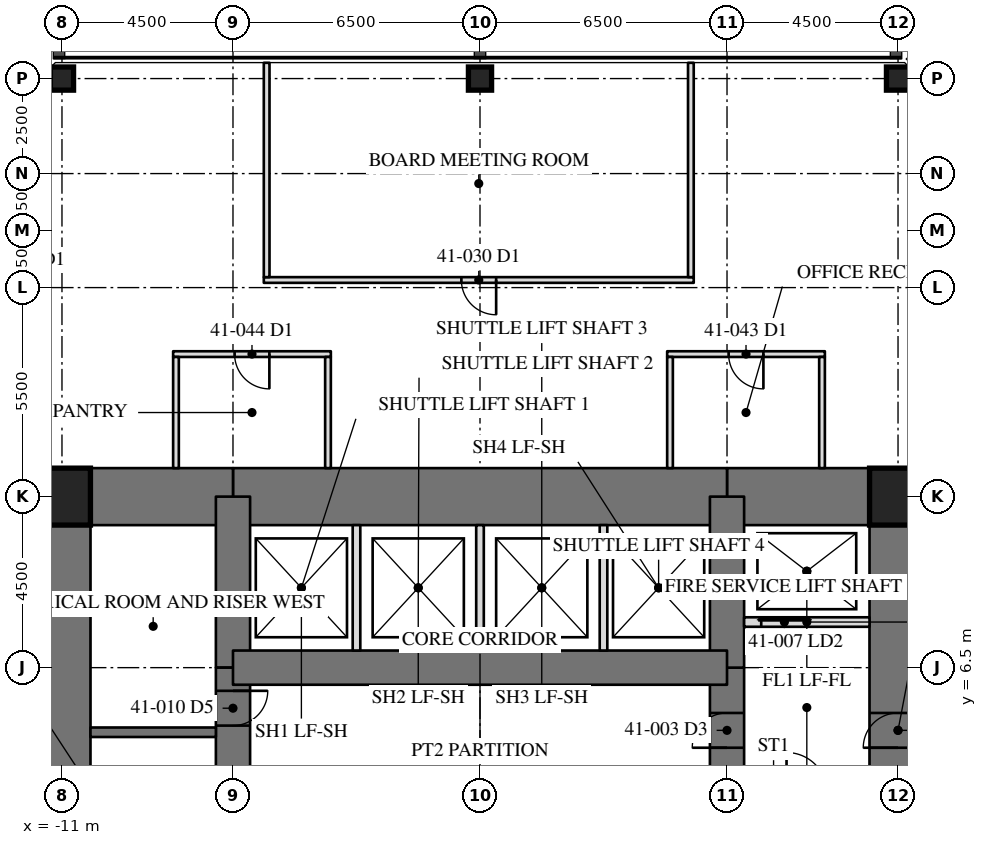
"""IFC4 building model, lengths in metres.
Left out: names, types, materials, properties, quantities, classifications, styles, units other than length and angle.
Written with IfcOpenShell. Run it as: python <this file> out.ifc"""

import sys

from ifc_helpers import new_model, si_unit, direction, frame, frame_2d, origin, origin_2d, place, context, subcontext, project, spatial, rectangle, hollow_rectangle, extrude, element, fill, save


model = new_model("IFC4")
c1 = context("Model", 3, precision=1e-05, world=origin(), true_north=direction((0.0, 1.0)))
c2 = subcontext(c1, "Body", "Model", "MODEL_VIEW")
j1 = project(units=[si_unit("LENGTHUNIT", "METRE"), si_unit("PLANEANGLEUNIT", "RADIAN")], contexts=[c1])
p1 = place(None, origin())
s1 = spatial("IfcSite", under=j1, at=p1, CompositionType="ELEMENT")
p2 = place(p1, origin())
s2 = spatial("IfcBuilding", under=s1, at=p2, CompositionType="ELEMENT")
p3 = place(p2, frame((0.0, 0.0, 174.6)))
s3 = spatial("IfcBuildingStorey", under=s2, at=p3, CompositionType="ELEMENT", Elevation=174.6)
for number, where, z_axis, x_axis in (
    (1, (11.0, 22.0, 0.0), (0.0, 0.0, 1.0), (1.0, 0.0, 0.0)),
    (2, (0.0, 22.0, 0.0), (0.0, 0.0, 1.0), (1.0, 0.0, 0.0)),
    (3, (-11.0, 22.0, 0.0), (0.0, 0.0, 1.0), (1.0, 0.0, 0.0)),
):
    element("IfcColumn", number, at=place(p3, frame(where, z_axis=z_axis, x_axis=x_axis)), inside=s3, PredefinedType="COLUMN", context=c2, shape_type="SweptSolid", body=[
        extrude(hollow_rectangle(XDim=0.61, YDim=0.61, WallThickness=0.076, at=origin_2d()), origin(), (0.0, 0.0, 1.0), 4.1),
    ])
p4 = place(p3, frame((11.0, -11.0, 0.0), z_axis=(0.0, 0.0, 1.0), x_axis=(0.0, 1.0, 0.0)))
e4 = element("IfcWall", 4, at=p4, inside=s3, PredefinedType="SHEAR", context=c2, shape_type="SweptSolid", body=[
    extrude(rectangle(XDim=22.0, YDim=1.5, at=frame_2d((11.0, 0.0))), origin(), (0.0, 0.0, 1.0), 4.1),
])
p5 = place(p4, frame((15.393, 0.0, 0.0)))
e5 = element("IfcOpeningElement", 5, at=p5, cuts=e4, PredefinedType="OPENING", context=c2, shape_type="SweptSolid", body=[
    extrude(rectangle(XDim=0.915, YDim=2.134, at=frame_2d((0.458, 1.067))), frame((0.0, 0.76, 0.0), z_axis=(0.0, -1.0, 0.0), x_axis=(1.0, 0.0, 0.0)), (0.0, 0.0, 1.0), 1.52),
])
p6 = place(p3, frame((-11.0, 11.0, 0.0), z_axis=(0.0, 0.0, 1.0), x_axis=(0.0, -1.0, 0.0)))
e6 = element("IfcWall", 6, at=p6, inside=s3, PredefinedType="SHEAR", context=c2, shape_type="SweptSolid", body=[
    extrude(rectangle(XDim=22.0, YDim=1.5, at=frame_2d((11.0, 0.0))), origin(), (0.0, 0.0, 1.0), 4.1),
])
p7 = place(p6, frame((15.393, 0.0, 0.0)))
e7 = element("IfcOpeningElement", 7, at=p7, cuts=e6, PredefinedType="OPENING", context=c2, shape_type="SweptSolid", body=[
    extrude(rectangle(XDim=0.915, YDim=2.134, at=frame_2d((0.458, 1.067))), frame((0.0, 0.76, 0.0), z_axis=(0.0, -1.0, 0.0), x_axis=(1.0, 0.0, 0.0)), (0.0, 0.0, 1.0), 1.52),
])
p8 = place(p3, frame((11.0, 11.0, 0.0), z_axis=(0.0, 0.0, 1.0), x_axis=(-1.0, 0.0, 0.0)))
e8 = element("IfcWall", 8, at=p8, inside=s3, PredefinedType="SHEAR", context=c2, shape_type="SweptSolid", body=[
    extrude(rectangle(XDim=4.5, YDim=1.5, at=frame_2d((2.25, 0.0))), origin(), (0.0, 0.0, 1.0), 4.1),
])
p9 = place(p3, frame((6.5, 11.0, 0.0), z_axis=(0.0, 0.0, 1.0), x_axis=(-1.0, 0.0, 0.0)))
e9 = element("IfcWall", 9, at=p9, inside=s3, PredefinedType="SHEAR", context=c2, shape_type="SweptSolid", body=[
    extrude(rectangle(XDim=13.0, YDim=1.5, at=frame_2d((6.5, 0.0))), origin(), (0.0, 0.0, 1.0), 4.1),
])
p10 = place(p3, frame((-6.5, 11.0, 0.0), z_axis=(0.0, 0.0, 1.0), x_axis=(-1.0, 0.0, 0.0)))
e10 = element("IfcWall", 10, at=p10, inside=s3, PredefinedType="SHEAR", context=c2, shape_type="SweptSolid", body=[
    extrude(rectangle(XDim=4.5, YDim=1.5, at=frame_2d((2.25, 0.0))), origin(), (0.0, 0.0, 1.0), 4.1),
])
p11 = place(p3, frame((6.5, -6.5, 0.0), z_axis=(0.0, 0.0, 1.0), x_axis=(0.0, 1.0, 0.0)))
e11 = element("IfcWall", 11, at=p11, inside=s3, PredefinedType="SHEAR", context=c2, shape_type="SweptSolid", body=[
    extrude(rectangle(XDim=13.0, YDim=0.9, at=frame_2d((6.5, 0.0))), origin(), (0.0, 0.0, 1.0), 4.1),
])
p12 = place(p11, frame((10.893, 0.0, 0.0)))
e12 = element("IfcOpeningElement", 12, at=p12, cuts=e11, PredefinedType="OPENING", context=c2, shape_type="SweptSolid", body=[
    extrude(rectangle(XDim=0.915, YDim=2.134, at=frame_2d((0.458, 1.067))), frame((0.0, 0.46, 0.0), z_axis=(0.0, -1.0, 0.0), x_axis=(1.0, 0.0, 0.0)), (0.0, 0.0, 1.0), 0.92),
])
p13 = place(p11, frame((0.61, 0.0, 0.0)))
e13 = element("IfcOpeningElement", 13, at=p13, cuts=e11, PredefinedType="OPENING", context=c2, shape_type="SweptSolid", body=[
    extrude(rectangle(XDim=0.915, YDim=2.134, at=frame_2d((0.458, 1.067))), frame((0.0, 0.46, 0.0), z_axis=(0.0, -1.0, 0.0), x_axis=(1.0, 0.0, 0.0)), (0.0, 0.0, 1.0), 0.92),
])
for number, where, z_axis, x_axis in (
    (14, (6.5, 6.5, 0.0), (0.0, 0.0, 1.0), (0.0, 1.0, 0.0)),
    (15, (-6.5, 11.0, 0.0), (0.0, 0.0, 1.0), (0.0, -1.0, 0.0)),
):
    element("IfcWall", number, at=place(p3, frame(where, z_axis=z_axis, x_axis=x_axis)), inside=s3, PredefinedType="SHEAR", context=c2, shape_type="SweptSolid", body=[
        extrude(rectangle(XDim=4.5, YDim=0.9, at=frame_2d((2.25, 0.0))), origin(), (0.0, 0.0, 1.0), 4.1),
    ])
p14 = place(p3, frame((-6.5, 6.5, 0.0), z_axis=(0.0, 0.0, 1.0), x_axis=(0.0, -1.0, 0.0)))
e16 = element("IfcWall", 16, at=p14, inside=s3, PredefinedType="SHEAR", context=c2, shape_type="SweptSolid", body=[
    extrude(rectangle(XDim=13.0, YDim=0.9, at=frame_2d((6.5, 0.0))), origin(), (0.0, 0.0, 1.0), 4.1),
])
p15 = place(p14, frame((10.893, 0.0, 0.0)))
e17 = element("IfcOpeningElement", 17, at=p15, cuts=e16, PredefinedType="OPENING", context=c2, shape_type="SweptSolid", body=[
    extrude(rectangle(XDim=0.915, YDim=2.134, at=frame_2d((0.458, 1.067))), frame((0.0, 0.46, 0.0), z_axis=(0.0, -1.0, 0.0), x_axis=(1.0, 0.0, 0.0)), (0.0, 0.0, 1.0), 0.92),
])
p16 = place(p14, frame((0.61, 0.0, 0.0)))
e18 = element("IfcOpeningElement", 18, at=p16, cuts=e16, PredefinedType="OPENING", context=c2, shape_type="SweptSolid", body=[
    extrude(rectangle(XDim=0.915, YDim=2.134, at=frame_2d((0.458, 1.067))), frame((0.0, 0.46, 0.0), z_axis=(0.0, -1.0, 0.0), x_axis=(1.0, 0.0, 0.0)), (0.0, 0.0, 1.0), 0.92),
])
p17 = place(p3, frame((6.5, 6.5, 0.0), z_axis=(0.0, 0.0, 1.0), x_axis=(-1.0, 0.0, 0.0)))
e19 = element("IfcWall", 19, at=p17, inside=s3, PredefinedType="SHEAR", context=c2, shape_type="SweptSolid", body=[
    extrude(rectangle(XDim=13.0, YDim=0.9, at=frame_2d((6.5, 0.0))), origin(), (0.0, 0.0, 1.0), 4.1),
])
for number, where, z_axis, x_axis in (
    (20, (11.0, 11.0, 0.0), (0.0, 0.0, 1.0), (1.0, 0.0, 0.0)),
    (21, (-11.0, 11.0, 0.0), (0.0, 0.0, 1.0), (1.0, 0.0, 0.0)),
):
    element("IfcColumn", number, at=place(p3, frame(where, z_axis=z_axis, x_axis=x_axis)), inside=s3, PredefinedType="COLUMN", context=c2, shape_type="SweptSolid", body=[
        extrude(hollow_rectangle(XDim=1.499, YDim=1.499, WallThickness=0.102, at=origin_2d()), origin(), (0.0, 0.0, 1.0), 4.1),
    ])
p18 = place(p3, frame((-6.95, 4.8, 0.0), z_axis=(0.0, 0.0, 1.0), x_axis=(-1.0, 0.0, 0.0)))
e22 = element("IfcWall", 22, at=p18, inside=s3, PredefinedType="SOLIDWALL", context=c2, shape_type="SweptSolid", body=[
    extrude(rectangle(XDim=3.3, YDim=0.25, at=frame_2d((1.65, 0.0))), origin(), (0.0, 0.0, 1.0), 3.91),
])
p19 = place(p3, frame((6.95, 7.7, 0.0), z_axis=(0.0, 0.0, 1.0), x_axis=(1.0, 0.0, 0.0)))
e23 = element("IfcWall", 23, at=p19, inside=s3, PredefinedType="PARTITIONING", context=c2, shape_type="SweptSolid", body=[
    extrude(rectangle(XDim=3.3, YDim=0.25, at=frame_2d((1.65, 0.0))), origin(), (0.0, 0.0, 1.0), 3.91),
])
p20 = place(p19, frame((0.45, 0.0, 0.0)))
e24 = element("IfcOpeningElement", 24, at=p20, cuts=e23, PredefinedType="OPENING", context=c2, shape_type="SweptSolid", body=[
    extrude(rectangle(XDim=1.219, YDim=2.134, at=frame_2d((0.609, 1.067))), frame((0.0, 0.135, 0.0), z_axis=(0.0, -1.0, 0.0), x_axis=(1.0, 0.0, 0.0)), (0.0, 0.0, 1.0), 0.27),
])
for number, where, z_axis, x_axis in (
    (25, (-3.25, 6.95, 0.0), (0.0, 0.0, 1.0), (0.0, 1.0, 0.0)),
    (26, (0.0, 6.95, 0.0), (0.0, 0.0, 1.0), (0.0, 1.0, 0.0)),
    (27, (3.25, 6.95, 0.0), (0.0, 0.0, 1.0), (0.0, 1.0, 0.0)),
):
    element("IfcWall", number, at=place(p3, frame(where, z_axis=z_axis, x_axis=x_axis)), inside=s3, PredefinedType="PARTITIONING", context=c2, shape_type="SweptSolid", body=[
        extrude(rectangle(XDim=3.3, YDim=0.2, at=frame_2d((1.65, 0.0))), origin(), (0.0, 0.0, 1.0), 3.91),
    ])
p21 = place(p3, frame((5.624, 16.7, 0.0), z_axis=(0.0, 0.0, 1.0), x_axis=(-1.0, 0.0, 0.0)))
e28 = element("IfcWall", 28, at=p21, inside=s3, PredefinedType="PARTITIONING", context=c2, shape_type="SweptSolid", body=[
    extrude(rectangle(XDim=11.313, YDim=0.15, at=frame_2d((5.656, 0.0))), origin(), (0.0, 0.0, 1.0), 3.91),
])
p22 = place(p21, frame((5.199, 0.0, 0.0)))
e29 = element("IfcOpeningElement", 29, at=p22, cuts=e28, PredefinedType="OPENING", context=c2, shape_type="SweptSolid", body=[
    extrude(rectangle(XDim=0.915, YDim=2.134, at=frame_2d((0.458, 1.067))), frame((0.0, 0.085, 0.0), z_axis=(0.0, -1.0, 0.0), x_axis=(1.0, 0.0, 0.0)), (0.0, 0.0, 1.0), 0.17),
])
for number, where, z_axis, x_axis in (
    (30, (5.549, 16.775, 0.0), (0.0, 0.0, 1.0), (0.0, 1.0, 0.0)),
    (31, (-5.614, 16.775, 0.0), (0.0, 0.0, 1.0), (0.0, 1.0, 0.0)),
):
    element("IfcWall", number, at=place(p3, frame(where, z_axis=z_axis, x_axis=x_axis)), inside=s3, PredefinedType="PARTITIONING", context=c2, shape_type="SweptSolid", body=[
        extrude(rectangle(XDim=5.64, YDim=0.15, at=frame_2d((2.82, 0.0))), origin(), (0.0, 0.0, 1.0), 3.91),
    ])
p23 = place(p3, frame((9.075, 14.75, 0.0), z_axis=(0.0, 0.0, 1.0), x_axis=(-1.0, 0.0, 0.0)))
e32 = element("IfcWall", 32, at=p23, inside=s3, PredefinedType="PARTITIONING", context=c2, shape_type="SweptSolid", body=[
    extrude(rectangle(XDim=4.15, YDim=0.15, at=frame_2d((2.075, 0.0))), origin(), (0.0, 0.0, 1.0), 3.91),
])
p24 = place(p23, frame((1.617, 0.0, 0.0)))
e33 = element("IfcOpeningElement", 33, at=p24, cuts=e32, PredefinedType="OPENING", context=c2, shape_type="SweptSolid", body=[
    extrude(rectangle(XDim=0.915, YDim=2.134, at=frame_2d((0.458, 1.067))), frame((0.0, 0.085, 0.0), z_axis=(0.0, -1.0, 0.0), x_axis=(1.0, 0.0, 0.0)), (0.0, 0.0, 1.0), 0.17),
])
for number, where, z_axis, x_axis in (
    (34, (9.0, 14.675, 0.0), (0.0, 0.0, 1.0), (0.0, -1.0, 0.0)),
    (35, (5.0, 14.675, 0.0), (0.0, 0.0, 1.0), (0.0, -1.0, 0.0)),
):
    element("IfcWall", number, at=place(p3, frame(where, z_axis=z_axis, x_axis=x_axis)), inside=s3, PredefinedType="PARTITIONING", context=c2, shape_type="SweptSolid", body=[
        extrude(rectangle(XDim=2.925, YDim=0.15, at=frame_2d((1.462, 0.0))), origin(), (0.0, 0.0, 1.0), 3.91),
    ])
p25 = place(p3, frame((-3.925, 14.75, 0.0), z_axis=(0.0, 0.0, 1.0), x_axis=(-1.0, 0.0, 0.0)))
e36 = element("IfcWall", 36, at=p25, inside=s3, PredefinedType="PARTITIONING", context=c2, shape_type="SweptSolid", body=[
    extrude(rectangle(XDim=4.15, YDim=0.15, at=frame_2d((2.075, 0.0))), origin(), (0.0, 0.0, 1.0), 3.91),
])
p26 = place(p25, frame((1.617, 0.0, 0.0)))
e37 = element("IfcOpeningElement", 37, at=p26, cuts=e36, PredefinedType="OPENING", context=c2, shape_type="SweptSolid", body=[
    extrude(rectangle(XDim=0.915, YDim=2.134, at=frame_2d((0.458, 1.067))), frame((0.0, 0.085, 0.0), z_axis=(0.0, -1.0, 0.0), x_axis=(1.0, 0.0, 0.0)), (0.0, 0.0, 1.0), 0.17),
])
for number, where, z_axis, x_axis in (
    (38, (-4.0, 14.675, 0.0), (0.0, 0.0, 1.0), (0.0, -1.0, 0.0)),
    (39, (-8.0, 14.675, 0.0), (0.0, 0.0, 1.0), (0.0, -1.0, 0.0)),
):
    element("IfcWall", number, at=place(p3, frame(where, z_axis=z_axis, x_axis=x_axis)), inside=s3, PredefinedType="PARTITIONING", context=c2, shape_type="SweptSolid", body=[
        extrude(rectangle(XDim=2.925, YDim=0.15, at=frame_2d((1.462, 0.0))), origin(), (0.0, 0.0, 1.0), 3.91),
    ])
p27 = place(p12, origin())
e40 = element("IfcDoor", 40, at=p27, inside=s3, OperationType="SINGLE_SWING_RIGHT", PredefinedType="DOOR", context=c2, shape_type="SweptSolid", body=[
    extrude(rectangle(XDim=0.915, YDim=2.134, at=frame_2d((0.458, 1.067))), frame((0.0, -0.375, 0.0), z_axis=(0.0, -1.0, 0.0), x_axis=(1.0, 0.0, 0.0)), (0.0, 0.0, 1.0), 0.05),
])
fill(e12, e40)
p28 = place(p20, origin())
e41 = element("IfcDoor", 41, at=p28, inside=s3, OperationType="SLIDING_TO_LEFT", PredefinedType="DOOR", context=c2, shape_type="SweptSolid", body=[
    extrude(rectangle(XDim=1.219, YDim=2.134, at=frame_2d((0.609, 1.067))), frame((0.0, 0.025, 0.0), z_axis=(0.0, -1.0, 0.0), x_axis=(1.0, 0.0, 0.0)), (0.0, 0.0, 1.0), 0.05),
])
fill(e24, e41)
p29 = place(p16, origin())
e42 = element("IfcDoor", 42, at=p29, inside=s3, OperationType="SINGLE_SWING_RIGHT", PredefinedType="DOOR", context=c2, shape_type="SweptSolid", body=[
    extrude(rectangle(XDim=0.915, YDim=2.134, at=frame_2d((0.458, 1.067))), frame((0.0, -0.375, 0.0), z_axis=(0.0, -1.0, 0.0), x_axis=(1.0, 0.0, 0.0)), (0.0, 0.0, 1.0), 0.05),
])
fill(e18, e42)
p30 = place(p22, origin())
e43 = element("IfcDoor", 43, at=p30, inside=s3, OperationType="SINGLE_SWING_LEFT", PredefinedType="DOOR", context=c2, shape_type="SweptSolid", body=[
    extrude(rectangle(XDim=0.915, YDim=2.134, at=frame_2d((0.458, 1.067))), frame((0.0, 0.025, 0.0), z_axis=(0.0, -1.0, 0.0), x_axis=(1.0, 0.0, 0.0)), (0.0, 0.0, 1.0), 0.05),
])
fill(e29, e43)
p31 = place(p24, origin())
e44 = element("IfcDoor", 44, at=p31, inside=s3, OperationType="SINGLE_SWING_LEFT", PredefinedType="DOOR", context=c2, shape_type="SweptSolid", body=[
    extrude(rectangle(XDim=0.915, YDim=2.134, at=frame_2d((0.458, 1.067))), frame((0.0, 0.025, 0.0), z_axis=(0.0, -1.0, 0.0), x_axis=(1.0, 0.0, 0.0)), (0.0, 0.0, 1.0), 0.05),
])
fill(e33, e44)
p32 = place(p26, origin())
e45 = element("IfcDoor", 45, at=p32, inside=s3, OperationType="SINGLE_SWING_LEFT", PredefinedType="DOOR", context=c2, shape_type="SweptSolid", body=[
    extrude(rectangle(XDim=0.915, YDim=2.134, at=frame_2d((0.458, 1.067))), frame((0.0, 0.025, 0.0), z_axis=(0.0, -1.0, 0.0), x_axis=(1.0, 0.0, 0.0)), (0.0, 0.0, 1.0), 0.05),
])
fill(e37, e45)
save(model, sys.argv[1])
